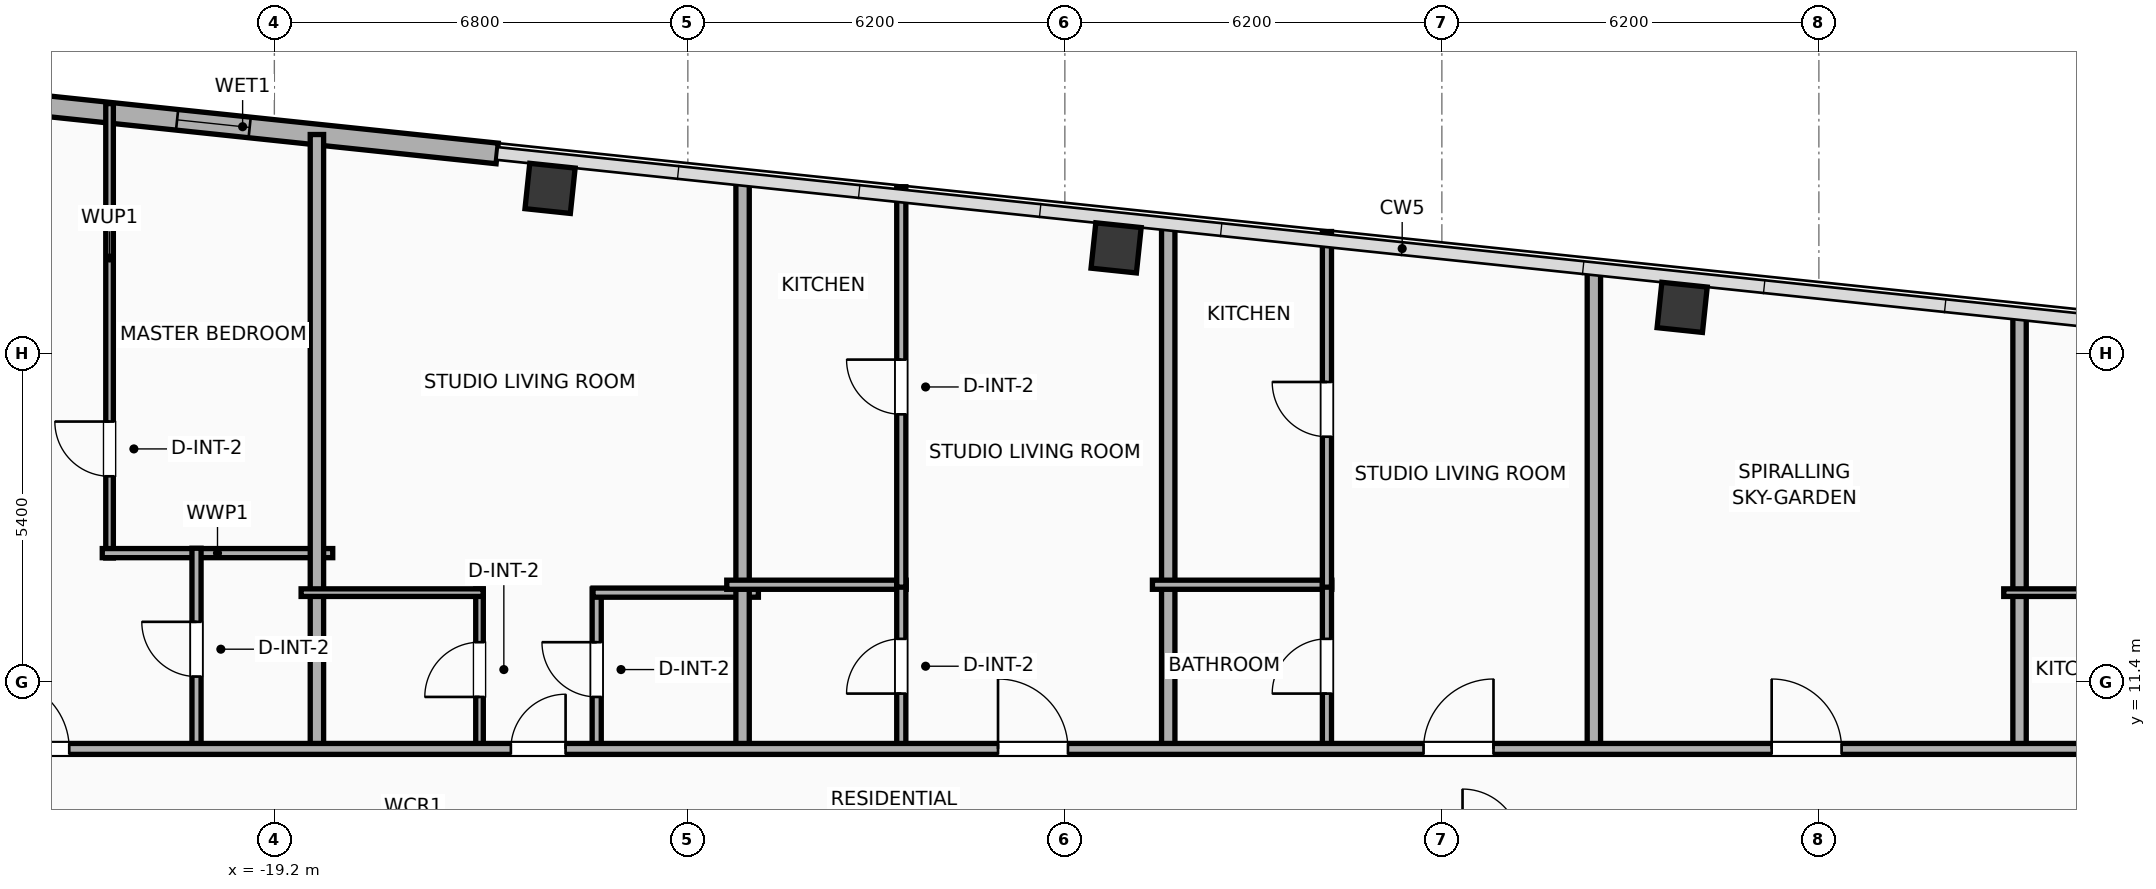
"""IFC4 building model, lengths in metres.
Left out: names, types, materials, properties, quantities, classifications, styles, units other than length and angle.
Written with IfcOpenShell. Run it as: python <this file> out.ifc"""

import sys

from ifc_helpers import new_model, si_unit, direction, frame, frame_2d, origin, origin_2d, place, context, subcontext, project, spatial, rectangle, hollow_rectangle, extrude, element, fill, save


model = new_model("IFC4")
c1 = context("Model", 3, precision=1e-05, world=origin(), true_north=direction((0.0, 1.0)))
c2 = subcontext(c1, "Body", "Model", "MODEL_VIEW")
j1 = project(units=[si_unit("LENGTHUNIT", "METRE"), si_unit("PLANEANGLEUNIT", "RADIAN")], contexts=[c1])
p1 = place(None, origin())
s1 = spatial("IfcSite", under=j1, at=p1, CompositionType="ELEMENT")
p2 = place(p1, origin())
s2 = spatial("IfcBuilding", under=s1, at=p2, CompositionType="ELEMENT")
p3 = place(p2, frame((0.0, 0.0, 267.8)))
s3 = spatial("IfcBuildingStorey", under=s2, at=p3, CompositionType="ELEMENT", Elevation=267.8)
for number, where, z_axis, x_axis in (
    (1, (3.952, 17.561, 0.0), (0.0, 0.0, 1.0), (0.995, -0.105, 0.0)),
    (2, (-5.357, 18.54, 0.0), (0.0, 0.0, 1.0), (0.995, -0.105, 0.0)),
    (3, (-14.666, 19.518, 0.0), (0.0, 0.0, 1.0), (0.995, -0.105, 0.0)),
):
    element("IfcColumn", number, at=place(p3, frame(where, z_axis=z_axis, x_axis=x_axis)), inside=s3, PredefinedType="COLUMN", context=c2, shape_type="SweptSolid", body=[
        extrude(hollow_rectangle(XDim=0.75, YDim=0.75, WallThickness=0.025, at=origin_2d()), origin(), (0.0, 0.0, 1.0), 3.9),
    ])
p4 = place(p3, frame((-23.908, 20.972, 0.0), z_axis=(0.0, 0.0, 1.0), x_axis=(0.994522285292, -0.104524753323, 0.0)))
e4 = element("IfcWall", 4, at=p4, inside=s3, PredefinedType="ELEMENTEDWALL", context=c2, shape_type="SweptSolid", body=[
    extrude(rectangle(XDim=8.418, YDim=0.34, at=frame_2d((4.209, 0.0))), origin(), (0.0, 0.0, 1.0), 3.65),
])
p5 = place(p4, frame((3.125, 0.0, 0.75)))
e5 = element("IfcOpeningElement", 5, at=p5, cuts=e4, PredefinedType="OPENING", context=c2, shape_type="SweptSolid", body=[
    extrude(rectangle(XDim=1.2, YDim=2.05, at=frame_2d((0.6, 1.025))), frame((0.0, 0.18, 0.0), z_axis=(0.0, -1.0, 0.0), x_axis=(1.0, 0.0, 0.0)), (0.0, 0.0, 1.0), 0.36),
])
p6 = place(p3, frame((-21.91, 13.44, 0.0), z_axis=(0.0, 0.0, 1.0), x_axis=(0.0, 1.0, 0.0)))
e6 = element("IfcWall", 6, at=p6, inside=s3, PredefinedType="PARTITIONING", context=c2, shape_type="SweptSolid", body=[
    extrude(rectangle(XDim=7.473, YDim=0.125, at=frame_2d((3.737, 0.0))), origin(), (0.0, 0.0, 1.0), 3.09),
])
p7 = place(p6, frame((1.344, 0.0, 0.0)))
e7 = element("IfcOpeningElement", 7, at=p7, cuts=e6, PredefinedType="OPENING", context=c2, shape_type="SweptSolid", body=[
    extrude(rectangle(XDim=0.9, YDim=2.05, at=frame_2d((0.45, 1.025))), frame((0.0, 0.073, 0.0), z_axis=(0.0, -1.0, 0.0), x_axis=(1.0, 0.0, 0.0)), (0.0, 0.0, 1.0), 0.145),
])
p8 = place(p3, frame((-22.03, 13.52, 0.0), z_axis=(0.0, 0.0, 1.0), x_axis=(1.0, 0.0, 0.0)))
e8 = element("IfcWall", 8, at=p8, inside=s3, PredefinedType="PLUMBINGWALL", context=c2, shape_type="SweptSolid", body=[
    extrude(rectangle(XDim=3.79, YDim=0.15, at=frame_2d((1.895, 0.0))), origin(), (0.0, 0.0, 1.0), 3.65),
])
p9 = place(p3, frame((-20.48, 10.28, 0.0), z_axis=(0.0, 0.0, 1.0), x_axis=(0.0, 1.0, 0.0)))
e9 = element("IfcWall", 9, at=p9, inside=s3, PredefinedType="PLUMBINGWALL", context=c2, shape_type="SweptSolid", body=[
    extrude(rectangle(XDim=3.32, YDim=0.15, at=frame_2d((1.66, 0.0))), origin(), (0.0, 0.0, 1.0), 3.09),
])
p10 = place(p9, frame((1.21, 0.0, 0.0)))
e10 = element("IfcOpeningElement", 10, at=p10, cuts=e9, PredefinedType="OPENING", context=c2, shape_type="SweptSolid", body=[
    extrude(rectangle(XDim=0.9, YDim=2.05, at=frame_2d((0.45, 1.025))), frame((0.0, 0.085, 0.0), z_axis=(0.0, -1.0, 0.0), x_axis=(1.0, 0.0, 0.0)), (0.0, 0.0, 1.0), 0.17),
])
p11 = place(p3, frame((-18.5, 10.22, 0.0), z_axis=(0.0, 0.0, 1.0), x_axis=(0.0, 1.0, 0.0)))
e11 = element("IfcWall", 11, at=p11, inside=s3, PredefinedType="PARTITIONING", context=c2, shape_type="SweptSolid", body=[
    extrude(rectangle(XDim=10.184, YDim=0.22, at=frame_2d((5.092, 0.0))), origin(), (0.0, 0.0, 1.0), 3.65),
])
p12 = place(p3, frame((-15.826, 10.28, 0.0), z_axis=(0.0, 0.0, 1.0), x_axis=(0.0, 1.0, 0.0)))
e12 = element("IfcWall", 12, at=p12, inside=s3, PredefinedType="PARTITIONING", context=c2, shape_type="SweptSolid", body=[
    extrude(rectangle(XDim=2.65, YDim=0.125, at=frame_2d((1.325, 0.0))), origin(), (0.0, 0.0, 1.0), 3.65),
])
p13 = place(p12, frame((0.875, 0.0, 0.0)))
e13 = element("IfcOpeningElement", 13, at=p13, cuts=e12, PredefinedType="OPENING", context=c2, shape_type="SweptSolid", body=[
    extrude(rectangle(XDim=0.9, YDim=2.05, at=frame_2d((0.45, 1.025))), frame((0.0, 0.073, 0.0), z_axis=(0.0, -1.0, 0.0), x_axis=(1.0, 0.0, 0.0)), (0.0, 0.0, 1.0), 0.145),
])
p14 = place(p3, frame((-13.899, 10.28, 0.0), z_axis=(0.0, 0.0, 1.0), x_axis=(0.0, 1.0, 0.0)))
e14 = element("IfcWall", 14, at=p14, inside=s3, PredefinedType="PLUMBINGWALL", context=c2, shape_type="SweptSolid", body=[
    extrude(rectangle(XDim=2.65, YDim=0.15, at=frame_2d((1.325, 0.0))), origin(), (0.0, 0.0, 1.0), 3.65),
])
p15 = place(p14, frame((0.875, 0.0, 0.0)))
e15 = element("IfcOpeningElement", 15, at=p15, cuts=e14, PredefinedType="OPENING", context=c2, shape_type="SweptSolid", body=[
    extrude(rectangle(XDim=0.9, YDim=2.05, at=frame_2d((0.45, 1.025))), frame((0.0, 0.085, 0.0), z_axis=(0.0, -1.0, 0.0), x_axis=(1.0, 0.0, 0.0)), (0.0, 0.0, 1.0), 0.17),
])
p16 = place(p3, frame((-18.76, 12.87, 0.0), z_axis=(0.0, 0.0, 1.0), x_axis=(1.0, 0.0, 0.0)))
e16 = element("IfcWall", 16, at=p16, inside=s3, PredefinedType="PARTITIONING", context=c2, shape_type="SweptSolid", body=[
    extrude(rectangle(XDim=2.994, YDim=0.125, at=frame_2d((1.497, 0.0))), origin(), (0.0, 0.0, 1.0), 3.65),
])
p17 = place(p3, frame((-13.959, 12.87, 0.0), z_axis=(0.0, 0.0, 1.0), x_axis=(1.0, 0.0, 0.0)))
e17 = element("IfcWall", 17, at=p17, inside=s3, PredefinedType="PLUMBINGWALL", context=c2, shape_type="SweptSolid", body=[
    extrude(rectangle(XDim=2.719, YDim=0.15, at=frame_2d((1.359, 0.0))), origin(), (0.0, 0.0, 1.0), 3.65),
])
p18 = place(p3, frame((-11.5, 10.22, 0.0), z_axis=(0.0, 0.0, 1.0), x_axis=(0.0, 1.0, 0.0)))
e18 = element("IfcWall", 18, at=p18, inside=s3, PredefinedType="PARTITIONING", context=c2, shape_type="SweptSolid", body=[
    extrude(rectangle(XDim=9.448, YDim=0.22, at=frame_2d((4.724, 0.0))), origin(), (0.0, 0.0, 1.0), 3.65),
])
p19 = place(p3, frame((-11.76, 13.0, 0.0), z_axis=(0.0, 0.0, 1.0), x_axis=(1.0, 0.0, 0.0)))
e19 = element("IfcWall", 19, at=p19, inside=s3, PredefinedType="PLUMBINGWALL", context=c2, shape_type="SweptSolid", body=[
    extrude(rectangle(XDim=2.95, YDim=0.15, at=frame_2d((1.475, 0.0))), origin(), (0.0, 0.0, 1.0), 3.65),
])
p20 = place(p3, frame((-8.89, 10.28, 0.0), z_axis=(0.0, 0.0, 1.0), x_axis=(0.0, 1.0, 0.0)))
e20 = element("IfcWall", 20, at=p20, inside=s3, PredefinedType="PLUMBINGWALL", context=c2, shape_type="SweptSolid", body=[
    extrude(rectangle(XDim=2.76, YDim=0.15, at=frame_2d((1.38, 0.0))), origin(), (0.0, 0.0, 1.0), 3.65),
])
p21 = place(p20, frame((0.93, 0.0, 0.0)))
e21 = element("IfcOpeningElement", 21, at=p21, cuts=e20, PredefinedType="OPENING", context=c2, shape_type="SweptSolid", body=[
    extrude(rectangle(XDim=0.9, YDim=2.05, at=frame_2d((0.45, 1.025))), frame((0.0, 0.085, 0.0), z_axis=(0.0, -1.0, 0.0), x_axis=(1.0, 0.0, 0.0)), (0.0, 0.0, 1.0), 0.17),
])
p22 = place(p3, frame((-8.89, 12.96, 0.0), z_axis=(0.0, 0.0, 1.0), x_axis=(0.0, 1.0, 0.0)))
e22 = element("IfcWall", 22, at=p22, inside=s3, PredefinedType="PLUMBINGWALL", context=c2, shape_type="SweptSolid", body=[
    extrude(rectangle(XDim=6.585, YDim=0.15, at=frame_2d((3.292, 0.0))), origin(), (0.0, 0.0, 1.0), 3.65),
])
p23 = place(p22, frame((2.842, 0.0, 0.0)))
e23 = element("IfcOpeningElement", 23, at=p23, cuts=e22, PredefinedType="OPENING", context=c2, shape_type="SweptSolid", body=[
    extrude(rectangle(XDim=0.9, YDim=2.05, at=frame_2d((0.45, 1.025))), frame((0.0, 0.085, 0.0), z_axis=(0.0, -1.0, 0.0), x_axis=(1.0, 0.0, 0.0)), (0.0, 0.0, 1.0), 0.17),
])
p24 = place(p3, frame((-4.5, 10.22, 0.0), z_axis=(0.0, 0.0, 1.0), x_axis=(0.0, 1.0, 0.0)))
e24 = element("IfcWall", 24, at=p24, inside=s3, PredefinedType="PARTITIONING", context=c2, shape_type="SweptSolid", body=[
    extrude(rectangle(XDim=8.712, YDim=0.22, at=frame_2d((4.356, 0.0))), origin(), (0.0, 0.0, 1.0), 3.09),
])
p25 = place(p3, frame((-4.76, 13.0, 0.0), z_axis=(0.0, 0.0, 1.0), x_axis=(1.0, 0.0, 0.0)))
e25 = element("IfcWall", 25, at=p25, inside=s3, PredefinedType="PLUMBINGWALL", context=c2, shape_type="SweptSolid", body=[
    extrude(rectangle(XDim=2.95, YDim=0.15, at=frame_2d((1.475, 0.0))), origin(), (0.0, 0.0, 1.0), 3.65),
])
p26 = place(p3, frame((-1.89, 10.28, 0.0), z_axis=(0.0, 0.0, 1.0), x_axis=(0.0, 1.0, 0.0)))
e26 = element("IfcWall", 26, at=p26, inside=s3, PredefinedType="PLUMBINGWALL", context=c2, shape_type="SweptSolid", body=[
    extrude(rectangle(XDim=2.76, YDim=0.15, at=frame_2d((1.38, 0.0))), origin(), (0.0, 0.0, 1.0), 3.65),
])
p27 = place(p26, frame((0.93, 0.0, 0.0)))
e27 = element("IfcOpeningElement", 27, at=p27, cuts=e26, PredefinedType="OPENING", context=c2, shape_type="SweptSolid", body=[
    extrude(rectangle(XDim=0.9, YDim=2.05, at=frame_2d((0.45, 1.025))), frame((0.0, 0.085, 0.0), z_axis=(0.0, -1.0, 0.0), x_axis=(1.0, 0.0, 0.0)), (0.0, 0.0, 1.0), 0.17),
])
p28 = place(p3, frame((-1.89, 12.96, 0.0), z_axis=(0.0, 0.0, 1.0), x_axis=(0.0, 1.0, 0.0)))
e28 = element("IfcWall", 28, at=p28, inside=s3, PredefinedType="PLUMBINGWALL", context=c2, shape_type="SweptSolid", body=[
    extrude(rectangle(XDim=5.849, YDim=0.15, at=frame_2d((2.924, 0.0))), origin(), (0.0, 0.0, 1.0), 3.65),
])
p29 = place(p28, frame((2.474, 0.0, 0.0)))
e29 = element("IfcOpeningElement", 29, at=p29, cuts=e28, PredefinedType="OPENING", context=c2, shape_type="SweptSolid", body=[
    extrude(rectangle(XDim=0.9, YDim=2.05, at=frame_2d((0.45, 1.025))), frame((0.0, 0.085, 0.0), z_axis=(0.0, -1.0, 0.0), x_axis=(1.0, 0.0, 0.0)), (0.0, 0.0, 1.0), 0.17),
])
p30 = place(p3, frame((2.5, 10.22, 0.0), z_axis=(0.0, 0.0, 1.0), x_axis=(0.0, 1.0, 0.0)))
e30 = element("IfcWall", 30, at=p30, inside=s3, PredefinedType="PARTITIONING", context=c2, shape_type="SweptSolid", body=[
    extrude(rectangle(XDim=7.977, YDim=0.22, at=frame_2d((3.988, 0.0))), origin(), (0.0, 0.0, 1.0), 3.65),
])
p31 = place(p3, frame((9.5, 10.22, 0.0), z_axis=(0.0, 0.0, 1.0), x_axis=(0.0, 1.0, 0.0)))
e31 = element("IfcWall", 31, at=p31, inside=s3, PredefinedType="PARTITIONING", context=c2, shape_type="SweptSolid", body=[
    extrude(rectangle(XDim=7.241, YDim=0.22, at=frame_2d((3.621, 0.0))), origin(), (0.0, 0.0, 1.0), 3.65),
])
p32 = place(p3, frame((9.24, 12.87, 0.0), z_axis=(0.0, 0.0, 1.0), x_axis=(1.0, 0.0, 0.0)))
e32 = element("IfcWall", 32, at=p32, inside=s3, PredefinedType="PARTITIONING", context=c2, shape_type="SweptSolid", body=[
    extrude(rectangle(XDim=2.994, YDim=0.125, at=frame_2d((1.497, 0.0))), origin(), (0.0, 0.0, 1.0), 3.65),
])
p33 = place(p3, frame((-28.495, 10.3, 0.0), z_axis=(0.0, 0.0, 1.0), x_axis=(1.0, 0.0, 0.0)))
e33 = element("IfcWall", 33, at=p33, inside=s3, PredefinedType="PARTITIONING", context=c2, shape_type="SweptSolid", body=[
    extrude(rectangle(XDim=53.956, YDim=0.18, at=frame_2d((26.978, 0.0))), origin(), (0.0, 0.0, 1.0), 3.65),
])
p34 = place(p33, frame((4.772, 0.0, 0.0)))
e34 = element("IfcOpeningElement", 34, at=p34, cuts=e33, PredefinedType="OPENING", context=c2, shape_type="SweptSolid", body=[
    extrude(rectangle(XDim=1.15, YDim=2.05, at=frame_2d((0.575, 1.025))), frame((0.0, 0.1, 0.0), z_axis=(0.0, -1.0, 0.0), x_axis=(1.0, 0.0, 0.0)), (0.0, 0.0, 1.0), 0.2),
])
p35 = place(p33, frame((13.185, 0.0, 0.0)))
e35 = element("IfcOpeningElement", 35, at=p35, cuts=e33, PredefinedType="OPENING", context=c2, shape_type="SweptSolid", body=[
    extrude(rectangle(XDim=0.9, YDim=2.05, at=frame_2d((0.45, 1.025))), frame((0.0, 0.1, 0.0), z_axis=(0.0, -1.0, 0.0), x_axis=(1.0, 0.0, 0.0)), (0.0, 0.0, 1.0), 0.2),
])
p36 = place(p33, frame((21.196, 0.0, 0.0)))
e36 = element("IfcOpeningElement", 36, at=p36, cuts=e33, PredefinedType="OPENING", context=c2, shape_type="SweptSolid", body=[
    extrude(rectangle(XDim=1.15, YDim=2.05, at=frame_2d((0.575, 1.025))), frame((0.0, 0.1, 0.0), z_axis=(0.0, -1.0, 0.0), x_axis=(1.0, 0.0, 0.0)), (0.0, 0.0, 1.0), 0.2),
])
p37 = place(p33, frame((28.194, 0.0, 0.0)))
e37 = element("IfcOpeningElement", 37, at=p37, cuts=e33, PredefinedType="OPENING", context=c2, shape_type="SweptSolid", body=[
    extrude(rectangle(XDim=1.15, YDim=2.05, at=frame_2d((0.575, 1.025))), frame((0.0, 0.1, 0.0), z_axis=(0.0, -1.0, 0.0), x_axis=(1.0, 0.0, 0.0)), (0.0, 0.0, 1.0), 0.2),
])
p38 = place(p33, frame((33.919, 0.0, 0.0)))
e38 = element("IfcOpeningElement", 38, at=p38, cuts=e33, PredefinedType="OPENING", context=c2, shape_type="SweptSolid", body=[
    extrude(rectangle(XDim=1.15, YDim=2.05, at=frame_2d((0.575, 1.025))), frame((0.0, 0.1, 0.0), z_axis=(0.0, -1.0, 0.0), x_axis=(1.0, 0.0, 0.0)), (0.0, 0.0, 1.0), 0.2),
])
p39 = place(p33, frame((41.182, 0.0, 0.0)))
e39 = element("IfcOpeningElement", 39, at=p39, cuts=e33, PredefinedType="OPENING", context=c2, shape_type="SweptSolid", body=[
    extrude(rectangle(XDim=0.9, YDim=2.05, at=frame_2d((0.45, 1.025))), frame((0.0, 0.1, 0.0), z_axis=(0.0, -1.0, 0.0), x_axis=(1.0, 0.0, 0.0)), (0.0, 0.0, 1.0), 0.2),
])
p40 = place(p33, frame((49.346, 0.0, 0.0)))
e40 = element("IfcOpeningElement", 40, at=p40, cuts=e33, PredefinedType="OPENING", context=c2, shape_type="SweptSolid", body=[
    extrude(rectangle(XDim=0.9, YDim=2.05, at=frame_2d((0.45, 1.025))), frame((0.0, 0.1, 0.0), z_axis=(0.0, -1.0, 0.0), x_axis=(1.0, 0.0, 0.0)), (0.0, 0.0, 1.0), 0.2),
])
p41 = place(p5, origin())
e41 = element("IfcWindow", 41, at=p41, inside=s3, PartitioningType="SINGLE_PANEL", PredefinedType="WINDOW", context=c2, shape_type="SweptSolid", body=[
    extrude(rectangle(XDim=1.2, YDim=2.05, at=frame_2d((0.6, 1.025))), frame((0.0, 0.03, 0.0), z_axis=(0.0, -1.0, 0.0), x_axis=(1.0, 0.0, 0.0)), (0.0, 0.0, 1.0), 0.06),
])
fill(e5, e41)
p42 = place(p7, origin())
e42 = element("IfcDoor", 42, at=p42, inside=s3, OperationType="SINGLE_SWING_RIGHT", PredefinedType="DOOR", context=c2, shape_type="SweptSolid", body=[
    extrude(rectangle(XDim=0.9, YDim=2.05, at=frame_2d((0.45, 1.025))), frame((0.0, 0.025, 0.0), z_axis=(0.0, -1.0, 0.0), x_axis=(1.0, 0.0, 0.0)), (0.0, 0.0, 1.0), 0.05),
])
fill(e7, e42)
p43 = place(p10, origin())
e43 = element("IfcDoor", 43, at=p43, inside=s3, OperationType="SINGLE_SWING_RIGHT", PredefinedType="DOOR", context=c2, shape_type="SweptSolid", body=[
    extrude(rectangle(XDim=0.9, YDim=2.05, at=frame_2d((0.45, 1.025))), frame((0.0, 0.025, 0.0), z_axis=(0.0, -1.0, 0.0), x_axis=(1.0, 0.0, 0.0)), (0.0, 0.0, 1.0), 0.05),
])
fill(e10, e43)
p44 = place(p13, origin())
e44 = element("IfcDoor", 44, at=p44, inside=s3, OperationType="SINGLE_SWING_LEFT", PredefinedType="DOOR", context=c2, shape_type="SweptSolid", body=[
    extrude(rectangle(XDim=0.9, YDim=2.05, at=frame_2d((0.45, 1.025))), frame((0.0, 0.025, 0.0), z_axis=(0.0, -1.0, 0.0), x_axis=(1.0, 0.0, 0.0)), (0.0, 0.0, 1.0), 0.05),
])
fill(e13, e44)
p45 = place(p15, origin())
e45 = element("IfcDoor", 45, at=p45, inside=s3, OperationType="SINGLE_SWING_RIGHT", PredefinedType="DOOR", context=c2, shape_type="SweptSolid", body=[
    extrude(rectangle(XDim=0.9, YDim=2.05, at=frame_2d((0.45, 1.025))), frame((0.0, 0.025, 0.0), z_axis=(0.0, -1.0, 0.0), x_axis=(1.0, 0.0, 0.0)), (0.0, 0.0, 1.0), 0.05),
])
fill(e15, e45)
p46 = place(p21, origin())
e46 = element("IfcDoor", 46, at=p46, inside=s3, OperationType="SINGLE_SWING_LEFT", PredefinedType="DOOR", context=c2, shape_type="SweptSolid", body=[
    extrude(rectangle(XDim=0.9, YDim=2.05, at=frame_2d((0.45, 1.025))), frame((0.0, 0.025, 0.0), z_axis=(0.0, -1.0, 0.0), x_axis=(1.0, 0.0, 0.0)), (0.0, 0.0, 1.0), 0.05),
])
fill(e21, e46)
p47 = place(p23, origin())
e47 = element("IfcDoor", 47, at=p47, inside=s3, OperationType="SINGLE_SWING_RIGHT", PredefinedType="DOOR", context=c2, shape_type="SweptSolid", body=[
    extrude(rectangle(XDim=0.9, YDim=2.05, at=frame_2d((0.45, 1.025))), frame((0.0, 0.025, 0.0), z_axis=(0.0, -1.0, 0.0), x_axis=(1.0, 0.0, 0.0)), (0.0, 0.0, 1.0), 0.05),
])
fill(e23, e47)
p48 = place(p27, origin())
e48 = element("IfcDoor", 48, at=p48, inside=s3, OperationType="SINGLE_SWING_LEFT", PredefinedType="DOOR", context=c2, shape_type="SweptSolid", body=[
    extrude(rectangle(XDim=0.9, YDim=2.05, at=frame_2d((0.45, 1.025))), frame((0.0, 0.025, 0.0), z_axis=(0.0, -1.0, 0.0), x_axis=(1.0, 0.0, 0.0)), (0.0, 0.0, 1.0), 0.05),
])
fill(e27, e48)
p49 = place(p29, origin())
e49 = element("IfcDoor", 49, at=p49, inside=s3, OperationType="SINGLE_SWING_RIGHT", PredefinedType="DOOR", context=c2, shape_type="SweptSolid", body=[
    extrude(rectangle(XDim=0.9, YDim=2.05, at=frame_2d((0.45, 1.025))), frame((0.0, 0.025, 0.0), z_axis=(0.0, -1.0, 0.0), x_axis=(1.0, 0.0, 0.0)), (0.0, 0.0, 1.0), 0.05),
])
fill(e29, e49)
p50 = place(p34, origin())
e50 = element("IfcDoor", 50, at=p50, inside=s3, OperationType="SINGLE_SWING_LEFT", PredefinedType="DOOR", context=c2, shape_type="SweptSolid", body=[
    extrude(rectangle(XDim=1.15, YDim=2.05, at=frame_2d((0.575, 1.025))), frame((0.0, 0.025, 0.0), z_axis=(0.0, -1.0, 0.0), x_axis=(1.0, 0.0, 0.0)), (0.0, 0.0, 1.0), 0.05),
])
fill(e34, e50)
p51 = place(p35, origin())
e51 = element("IfcDoor", 51, at=p51, inside=s3, OperationType="SINGLE_SWING_RIGHT", PredefinedType="DOOR", context=c2, shape_type="SweptSolid", body=[
    extrude(rectangle(XDim=0.9, YDim=2.05, at=frame_2d((0.45, 1.025))), frame((0.0, 0.025, 0.0), z_axis=(0.0, -1.0, 0.0), x_axis=(1.0, 0.0, 0.0)), (0.0, 0.0, 1.0), 0.05),
])
fill(e35, e51)
p52 = place(p36, origin())
e52 = element("IfcDoor", 52, at=p52, inside=s3, OperationType="SINGLE_SWING_LEFT", PredefinedType="DOOR", context=c2, shape_type="SweptSolid", body=[
    extrude(rectangle(XDim=1.15, YDim=2.05, at=frame_2d((0.575, 1.025))), frame((0.0, 0.025, 0.0), z_axis=(0.0, -1.0, 0.0), x_axis=(1.0, 0.0, 0.0)), (0.0, 0.0, 1.0), 0.05),
])
fill(e36, e52)
p53 = place(p37, origin())
e53 = element("IfcDoor", 53, at=p53, inside=s3, OperationType="SINGLE_SWING_RIGHT", PredefinedType="DOOR", context=c2, shape_type="SweptSolid", body=[
    extrude(rectangle(XDim=1.15, YDim=2.05, at=frame_2d((0.575, 1.025))), frame((0.0, 0.025, 0.0), z_axis=(0.0, -1.0, 0.0), x_axis=(1.0, 0.0, 0.0)), (0.0, 0.0, 1.0), 0.05),
])
fill(e37, e53)
p54 = place(p38, origin())
e54 = element("IfcDoor", 54, at=p54, inside=s3, OperationType="SINGLE_SWING_LEFT", PredefinedType="DOOR", context=c2, shape_type="SweptSolid", body=[
    extrude(rectangle(XDim=1.15, YDim=2.05, at=frame_2d((0.575, 1.025))), frame((0.0, 0.025, 0.0), z_axis=(0.0, -1.0, 0.0), x_axis=(1.0, 0.0, 0.0)), (0.0, 0.0, 1.0), 0.05),
])
fill(e38, e54)
save(model, sys.argv[1])
